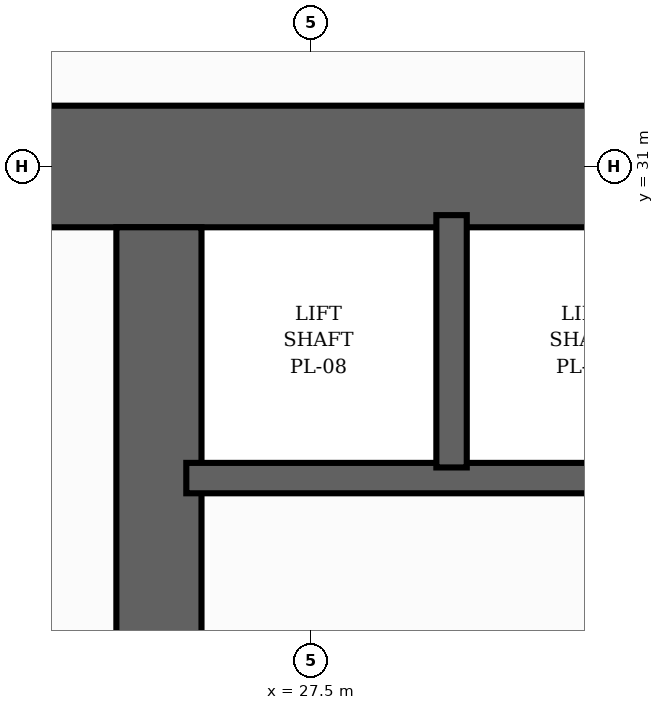
"""IFC4 building model, lengths in metres.
Left out: names, types, materials, properties, quantities, classifications, styles, units other than length and angle.
Written with IfcOpenShell. Run it as: python <this file> out.ifc"""

import sys

from ifc_helpers import new_model, si_unit, direction, frame, frame_2d, origin, place, context, subcontext, project, spatial, rectangle, extrude, element, save


model = new_model("IFC4")
c1 = context("Model", 3, precision=1e-05, world=origin(), true_north=direction((0.0, 1.0)))
c2 = subcontext(c1, "Body", "Model", "MODEL_VIEW")
j1 = project(units=[si_unit("LENGTHUNIT", "METRE"), si_unit("PLANEANGLEUNIT", "RADIAN")], contexts=[c1])
p1 = place(None, origin())
s1 = spatial("IfcSite", under=j1, at=p1, CompositionType="ELEMENT")
p2 = place(p1, origin())
s2 = spatial("IfcBuilding", under=s1, at=p2, CompositionType="ELEMENT")
p3 = place(p2, frame((0.0, 0.0, 4.0)))
s3 = spatial("IfcBuildingStorey", under=s2, at=p3, CompositionType="ELEMENT", Elevation=4.0)
p4 = place(p3, frame((22.6, 31.0, 0.0), z_axis=(0.0, 0.0, 1.0), x_axis=(1.0, 0.0, 0.0)))
e1 = element("IfcWall", 1, at=p4, inside=s3, PredefinedType="SHEAR", context=c2, shape_type="SweptSolid", body=[
    extrude(rectangle(XDim=18.8, YDim=0.8, at=frame_2d((9.4, 0.0))), origin(), (0.0, 0.0, 1.0), 4.0),
])
p5 = place(p4, frame((11.8, 0.0, 0.0)))
e2 = element("IfcOpeningElement", 2, at=p5, cuts=e1, PredefinedType="OPENING", context=c2, shape_type="SweptSolid", body=[
    extrude(rectangle(XDim=1.1, YDim=2.15, at=frame_2d((0.55, 1.075))), frame((0.0, 0.41, 0.0), z_axis=(0.0, -1.0, 0.0), x_axis=(1.0, 0.0, 0.0)), (0.0, 0.0, 1.0), 0.82),
])
p6 = place(p3, frame((26.5, 17.4, 0.0), z_axis=(0.0, 0.0, 1.0), x_axis=(0.0, 1.0, 0.0)))
e3 = element("IfcWall", 3, at=p6, inside=s3, PredefinedType="SHEAR", context=c2, shape_type="SweptSolid", body=[
    extrude(rectangle(XDim=13.2, YDim=0.56, at=frame_2d((6.6, 0.0))), origin(), (0.0, 0.0, 1.0), 4.0),
])
p7 = place(p3, frame((26.68, 28.95, 0.0), z_axis=(0.0, 0.0, 1.0), x_axis=(1.0, 0.0, 0.0)))
e4 = element("IfcWall", 4, at=p7, inside=s3, PredefinedType="SHEAR", context=c2, shape_type="SweptSolid", body=[
    extrude(rectangle(XDim=5.24, YDim=0.2, at=frame_2d((2.62, 0.0))), origin(), (0.0, 0.0, 1.0), 4.0),
])
p8 = place(p3, frame((28.425, 29.02, 0.0), z_axis=(0.0, 0.0, 1.0), x_axis=(0.0, 1.0, 0.0)))
e5 = element("IfcWall", 5, at=p8, inside=s3, PredefinedType="SHEAR", context=c2, shape_type="SweptSolid", body=[
    extrude(rectangle(XDim=1.66, YDim=0.2, at=frame_2d((0.83, 0.0))), origin(), (0.0, 0.0, 1.0), 4.0),
])
save(model, sys.argv[1])
